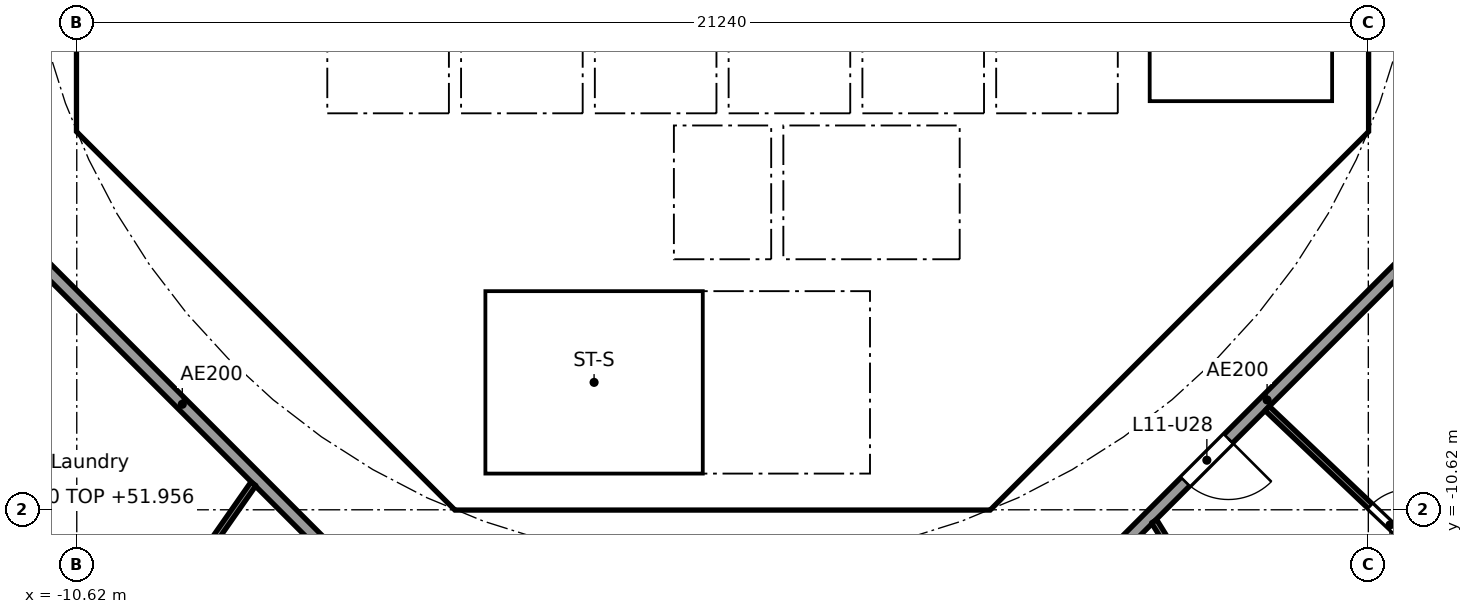
"""IFC4 building model, lengths in metres.
Left out: names, types, materials, properties, quantities, classifications, styles, units other than length and angle.
Written with IfcOpenShell. Run it as: python <this file> out.ifc"""

import sys

from ifc_helpers import new_model, si_unit, direction, frame, frame_2d, origin, place, context, subcontext, project, spatial, polyline, rectangle, outline, extrude, element, fill, save


model = new_model("IFC4")
c1 = context("Model", 3, precision=1e-05, world=origin(), true_north=direction((0.0, 1.0)))
c2 = subcontext(c1, "Body", "Model", "MODEL_VIEW")
j1 = project(units=[si_unit("LENGTHUNIT", "METRE"), si_unit("PLANEANGLEUNIT", "RADIAN")], contexts=[c1])
p1 = place(None, origin())
s1 = spatial("IfcSite", under=j1, at=p1, CompositionType="ELEMENT")
p2 = place(p1, origin())
s2 = spatial("IfcBuilding", under=s1, at=p2, CompositionType="ELEMENT")
p3 = place(p2, frame((0.0, 0.0, 49.2)))
s3 = spatial("IfcBuildingStorey", under=s2, at=p3, CompositionType="ELEMENT", Elevation=49.2)
p4 = place(p3, frame((-10.325, 3.801, 0.0), z_axis=(0.0, 0.0, 1.0), x_axis=(0.0, -1.0, 0.0)))
e1 = element("IfcWall", 1, at=p4, inside=s3, PredefinedType="SHEAR", context=c2, shape_type="SweptSolid", body=[
    extrude(rectangle(XDim=7.602, YDim=0.6, at=frame_2d((3.801, 0.0))), origin(), (0.0, 0.0, 1.0), 3.44),
])
p5 = place(p4, frame((0.651, 0.0, 0.0)))
e2 = element("IfcOpeningElement", 2, at=p5, cuts=e1, PredefinedType="OPENING", context=c2, shape_type="SweptSolid", body=[
    extrude(rectangle(XDim=1.5, YDim=2.1, at=frame_2d((0.75, 1.05))), frame((0.0, 0.31, 0.0), z_axis=(0.0, -1.0, 0.0), x_axis=(1.0, 0.0, 0.0)), (0.0, 0.0, 1.0), 0.62),
])
p6 = place(p4, frame((5.451, 0.0, 0.0)))
e3 = element("IfcOpeningElement", 3, at=p6, cuts=e1, PredefinedType="OPENING", context=c2, shape_type="SweptSolid", body=[
    extrude(rectangle(XDim=1.5, YDim=2.1, at=frame_2d((0.75, 1.05))), frame((0.0, 0.31, 0.0), z_axis=(0.0, -1.0, 0.0), x_axis=(1.0, 0.0, 0.0)), (0.0, 0.0, 1.0), 0.62),
])
p7 = place(p3, frame((-9.988, -4.613, 0.0), z_axis=(0.0, 0.0, 1.0), x_axis=(0.707106781187, -0.707106781187, 0.0)))
e4 = element("IfcWall", 4, at=p7, inside=s3, PredefinedType="SHEAR", context=c2, shape_type="SweptSolid", body=[
    extrude(rectangle(XDim=7.602, YDim=0.6, at=frame_2d((3.801, 0.0))), origin(), (0.0, 0.0, 1.0), 3.44),
])
p8 = place(p7, frame((6.151, 0.0, 0.0)))
e5 = element("IfcOpeningElement", 5, at=p8, cuts=e4, PredefinedType="OPENING", context=c2, shape_type="SweptSolid", body=[
    extrude(rectangle(XDim=1.1, YDim=2.1, at=frame_2d((0.55, 1.05))), frame((0.0, 0.31, 0.0), z_axis=(0.0, -1.0, 0.0), x_axis=(1.0, 0.0, 0.0)), (0.0, 0.0, 1.0), 0.62),
])
p9 = place(p3, frame((4.613, -9.988, 0.0), z_axis=(0.0, 0.0, 1.0), x_axis=(0.707106781187, 0.707106781187, 0.0)))
e6 = element("IfcWall", 6, at=p9, inside=s3, PredefinedType="SHEAR", context=c2, shape_type="SweptSolid", body=[
    extrude(rectangle(XDim=7.602, YDim=0.6, at=frame_2d((3.801, 0.0))), origin(), (0.0, 0.0, 1.0), 3.44),
])
p10 = place(p9, frame((3.201, 0.0, 0.0)))
e7 = element("IfcOpeningElement", 7, at=p10, cuts=e6, PredefinedType="OPENING", context=c2, shape_type="SweptSolid", body=[
    extrude(rectangle(XDim=1.2, YDim=2.1, at=frame_2d((0.6, 1.05))), frame((0.0, 0.31, 0.0), z_axis=(0.0, -1.0, 0.0), x_axis=(1.0, 0.0, 0.0)), (0.0, 0.0, 1.0), 0.62),
])
p11 = place(p3, frame((4.0, -10.025, 0.0), z_axis=(0.0, 0.0, 1.0), x_axis=(0.0, 1.0, 0.0)))
e8 = element("IfcWall", 8, at=p11, inside=s3, PredefinedType="SOLIDWALL", context=c2, shape_type="SweptSolid", body=[
    extrude(rectangle(XDim=3.0, YDim=0.2, at=frame_2d((1.5, 0.0))), origin(), (0.0, 0.0, 1.0), 3.44),
])
p12 = place(p11, frame((0.975, 0.0, 0.0)))
e9 = element("IfcOpeningElement", 9, at=p12, cuts=e8, PredefinedType="OPENING", context=c2, shape_type="SweptSolid", body=[
    extrude(rectangle(XDim=1.1, YDim=2.1, at=frame_2d((0.55, 1.05))), frame((0.0, 0.11, 0.0), z_axis=(0.0, -1.0, 0.0), x_axis=(1.0, 0.0, 0.0)), (0.0, 0.0, 1.0), 0.22),
])
p13 = place(p3, frame((-6.2, -7.827, 0.0), z_axis=(0.0, 0.0, 1.0), x_axis=(0.0, 1.0, 0.0)))
e10 = element("IfcWall", 10, at=p13, inside=s3, PredefinedType="PARTITIONING", context=c2, shape_type="SweptSolid", body=[
    extrude(rectangle(XDim=3.527, YDim=0.15, at=frame_2d((1.763, 0.0))), origin(), (0.0, 0.0, 1.0), 3.44),
])
p14 = place(p13, frame((1.276, 0.0, 0.0)))
e11 = element("IfcOpeningElement", 11, at=p14, cuts=e10, PredefinedType="OPENING", context=c2, shape_type="SweptSolid", body=[
    extrude(rectangle(XDim=0.9, YDim=2.1, at=frame_2d((0.45, 1.05))), frame((0.0, 0.085, 0.0), z_axis=(0.0, -1.0, 0.0), x_axis=(1.0, 0.0, 0.0)), (0.0, 0.0, 1.0), 0.17),
])
p15 = place(p3, frame((4.0, -6.5, 0.0), z_axis=(0.0, 0.0, 1.0), x_axis=(0.0, 1.0, 0.0)))
e12 = element("IfcWall", 12, at=p15, inside=s3, PredefinedType="SOLIDWALL", context=c2, shape_type="SweptSolid", body=[
    extrude(rectangle(XDim=2.2, YDim=0.2, at=frame_2d((1.1, 0.0))), origin(), (0.0, 0.0, 1.0), 3.44),
])
p16 = place(p15, frame((0.55, 0.0, 0.0)))
e13 = element("IfcOpeningElement", 13, at=p16, cuts=e12, PredefinedType="OPENING", context=c2, shape_type="SweptSolid", body=[
    extrude(rectangle(XDim=1.1, YDim=2.1, at=frame_2d((0.55, 1.05))), frame((0.0, 0.11, 0.0), z_axis=(0.0, -1.0, 0.0), x_axis=(1.0, 0.0, 0.0)), (0.0, 0.0, 1.0), 0.22),
])
p17 = place(p3, frame((-4.0, -6.5, 0.0), z_axis=(0.0, 0.0, 1.0), x_axis=(0.0, 1.0, 0.0)))
e14 = element("IfcWall", 14, at=p17, inside=s3, PredefinedType="SOLIDWALL", context=c2, shape_type="SweptSolid", body=[
    extrude(rectangle(XDim=2.2, YDim=0.2, at=frame_2d((1.1, 0.0))), origin(), (0.0, 0.0, 1.0), 3.44),
])
p18 = place(p17, frame((0.65, 0.0, 0.0)))
e15 = element("IfcOpeningElement", 15, at=p18, cuts=e14, PredefinedType="OPENING", context=c2, shape_type="SweptSolid", body=[
    extrude(rectangle(XDim=0.9, YDim=2.1, at=frame_2d((0.45, 1.05))), frame((0.0, 0.11, 0.0), z_axis=(0.0, -1.0, 0.0), x_axis=(1.0, 0.0, 0.0)), (0.0, 0.0, 1.0), 0.22),
])
p19 = place(p3, origin())
e16 = element("IfcWall", 16, at=p19, inside=s3, PredefinedType="SHEAR", context=c2, shape_type="SweptSolid", body=[
    extrude(outline(polyline([(-10.625, -3.801), (-10.025, -3.801), (-10.025, -4.152), (-9.776, -4.401), (-10.2, -4.825), (-10.625, -4.401), (-10.625, -3.801)])), origin(), (0.0, 0.0, 1.0), 3.44),
])
p20 = place(p3, origin())
e17 = element("IfcWall", 17, at=p20, inside=s3, PredefinedType="SHEAR", context=c2, shape_type="SweptSolid", body=[
    extrude(outline(polyline([(-4.152, -10.025), (4.152, -10.025), (4.401, -9.776), (4.825, -10.2), (4.401, -10.625), (-4.401, -10.625), (-4.825, -10.2), (-4.401, -9.776), (-4.152, -10.025)])), origin(), (0.0, 0.0, 1.0), 3.44),
])
p21 = place(p3, origin())
e18 = element("IfcWall", 18, at=p21, inside=s3, PredefinedType="SHEAR", context=c2, shape_type="SweptSolid", body=[
    extrude(outline(polyline([(9.776, -4.401), (10.025, -4.152), (10.025, -3.801), (10.025, 4.152), (9.776, 4.401), (10.2, 4.825), (10.625, 4.401), (10.625, -4.401), (10.2, -4.825), (9.776, -4.401)])), origin(), (0.0, 0.0, 1.0), 3.44),
])
for number, where, z_axis, x_axis in (
    (19, (-0.9, -6.5, 0.0), (0.0, 0.0, 1.0), (0.0, 1.0, 0.0)),
    (20, (0.9, -6.5, 0.0), (0.0, 0.0, 1.0), (0.0, 1.0, 0.0)),
):
    element("IfcWall", number, at=place(p3, frame(where, z_axis=z_axis, x_axis=x_axis)), inside=s3, PredefinedType="SOLIDWALL", context=c2, shape_type="SweptSolid", body=[
        extrude(rectangle(XDim=2.2, YDim=0.2, at=frame_2d((1.1, 0.0))), origin(), (0.0, 0.0, 1.0), 3.44),
    ])
p22 = place(p3, origin())
e21 = element("IfcWall", 21, at=p22, inside=s3, PredefinedType="SOLIDWALL", context=c2, shape_type="SweptSolid", body=[
    extrude(outline(polyline([(-6.7, -2.1), (-6.5, -2.1), (-6.5, -4.1), (-4.5, -4.1), (-4.5, -2.1), (-4.3, -2.1), (-4.3, -4.1), (-2.3, -4.1), (-2.3, -2.1), (-2.1, -2.1), (-2.1, -4.1), (-0.1, -4.1), (-0.1, -2.1), (0.1, -2.1), (0.1, -4.1), (2.1, -4.1), (2.1, -2.1), (2.3, -2.1), (2.3, -4.1), (4.3, -4.1), (4.3, -2.1), (4.5, -2.1), (4.5, -4.1), (6.5, -4.1), (6.5, -2.1), (6.7, -2.1), (6.7, -4.3), (-6.7, -4.3), (-6.7, -2.1)])), origin(), (0.0, 0.0, 1.0), 3.44),
])
p23 = place(p3, frame((-10.025, -4.0, 0.0), z_axis=(0.0, 0.0, 1.0), x_axis=(1.0, 0.0, 0.0)))
e22 = element("IfcWall", 22, at=p23, inside=s3, PredefinedType="PARTITIONING", context=c2, shape_type="SweptSolid", body=[
    extrude(rectangle(XDim=3.325, YDim=0.2, at=frame_2d((1.662, 0.0))), origin(), (0.0, 0.0, 1.0), 3.44),
])
p24 = place(p3, origin())
e23 = element("IfcWall", 23, at=p24, inside=s3, PredefinedType="SOLIDWALL", context=c2, shape_type="SweptSolid", body=[
    extrude(outline(polyline([(-3.9, -10.025), (-4.1, -10.025), (-4.1, -7.025), (-3.9, -7.025), (-3.9, -10.025)])), origin(), (0.0, 0.0, 1.0), 3.44),
])
p25 = place(p3, origin())
e24 = element("IfcWall", 24, at=p25, inside=s3, PredefinedType="SOLIDWALL", context=c2, shape_type="SweptSolid", body=[
    extrude(outline(polyline([(4.1, -7.025), (-4.1, -7.025), (-4.1, -6.5), (4.1, -6.5), (4.1, -7.025)])), origin(), (0.0, 0.0, 1.0), 3.44),
])
p26 = place(p3, origin())
e25 = element("IfcWall", 25, at=p26, inside=s3, PredefinedType="SOLIDWALL", context=c2, shape_type="SweptSolid", body=[
    extrude(outline(polyline([(7.025, -3.9), (6.7, -3.9), (6.7, 3.9), (7.025, 3.9), (7.025, -3.9)])), origin(), (0.0, 0.0, 1.0), 3.44),
])
p27 = place(p3, origin())
e26 = element("IfcWall", 26, at=p27, inside=s3, PredefinedType="SOLIDWALL", context=c2, shape_type="SweptSolid", body=[
    extrude(outline(polyline([(10.025, -4.1), (6.7, -4.1), (6.7, -3.9), (10.025, -3.9), (10.025, -4.1)])), origin(), (0.0, 0.0, 1.0), 3.44),
])
p28 = place(p3, frame((-12.635, -5.134, 0.0), z_axis=(0.0, 0.0, 1.0), x_axis=(0.707106781187, -0.707106781187, 0.0)))
e27 = element("IfcWall", 27, at=p28, inside=s3, PredefinedType="PARTITIONING", context=c2, shape_type="SweptSolid", body=[
    extrude(rectangle(XDim=10.609, YDim=0.2, at=frame_2d((5.305, 0.0))), origin(), (0.0, 0.0, 1.0), 3.44),
])
p29 = place(p3, frame((5.275, -12.494, 0.0), z_axis=(0.0, 0.0, 1.0), x_axis=(0.707106781187, 0.707106781187, 0.0)))
e28 = element("IfcWall", 28, at=p29, inside=s3, PredefinedType="PARTITIONING", context=c2, shape_type="SweptSolid", body=[
    extrude(rectangle(XDim=10.409, YDim=0.2, at=frame_2d((5.205, 0.0))), origin(), (0.0, 0.0, 1.0), 3.44),
])
p30 = place(p29, frame((3.303, 0.0, 0.0)))
e29 = element("IfcOpeningElement", 29, at=p30, cuts=e28, PredefinedType="OPENING", context=c2, shape_type="SweptSolid", body=[
    extrude(rectangle(XDim=1.0, YDim=2.1, at=frame_2d((0.5, 1.05))), frame((0.0, 0.11, 0.0), z_axis=(0.0, -1.0, 0.0), x_axis=(1.0, 0.0, 0.0)), (0.0, 0.0, 1.0), 0.22),
])
p31 = place(p3, frame((-13.222, -10.007, 0.0), z_axis=(0.0, 0.0, 1.0), x_axis=(0.640807748916, -0.767701393075, 0.0)))
e30 = element("IfcWall", 30, at=p31, inside=s3, PredefinedType="PARTITIONING", context=c2, shape_type="SweptSolid", body=[
    extrude(rectangle(XDim=4.737, YDim=0.1, at=frame_2d((2.368, 0.0))), origin(), (0.0, 0.0, 1.0), 2.756),
])
p32 = place(p31, frame((1.943, 0.0, 0.0)))
e31 = element("IfcOpeningElement", 31, at=p32, cuts=e30, PredefinedType="OPENING", context=c2, shape_type="SweptSolid", body=[
    extrude(rectangle(XDim=0.9, YDim=2.1, at=frame_2d((0.45, 1.05))), frame((0.0, 0.06, 0.0), z_axis=(0.0, -1.0, 0.0), x_axis=(1.0, 0.0, 0.0)), (0.0, 0.0, 1.0), 0.12),
])
p33 = place(p3, frame((-7.715, -10.193, 0.0), z_axis=(0.0, 0.0, 1.0), x_axis=(-0.573126502256, -0.819466907454, 0.0)))
e32 = element("IfcWall", 32, at=p33, inside=s3, PredefinedType="PARTITIONING", context=c2, shape_type="SweptSolid", body=[
    extrude(rectangle(XDim=9.954, YDim=0.1, at=frame_2d((4.977, 0.0))), origin(), (0.0, 0.0, 1.0), 2.687),
])
p34 = place(p3, frame((7.097, -10.81, 0.0), z_axis=(0.0, 0.0, 1.0), x_axis=(0.526453266471, -0.850204068576, 0.0)))
e33 = element("IfcWall", 33, at=p34, inside=s3, PredefinedType="PARTITIONING", context=c2, shape_type="SweptSolid", body=[
    extrude(rectangle(XDim=19.85, YDim=0.1, at=frame_2d((9.925, 0.0))), origin(), (0.0, 0.0, 1.0), 2.687),
])
p35 = place(p34, frame((0.35, 0.0, 0.0)))
e34 = element("IfcOpeningElement", 34, at=p35, cuts=e33, PredefinedType="OPENING", context=c2, shape_type="SweptSolid", body=[
    extrude(rectangle(XDim=0.9, YDim=2.1, at=frame_2d((0.45, 1.05))), frame((0.0, 0.06, 0.0), z_axis=(0.0, -1.0, 0.0), x_axis=(1.0, 0.0, 0.0)), (0.0, 0.0, 1.0), 0.12),
])
p36 = place(p34, frame((8.795, 0.0, 0.0)))
e35 = element("IfcOpeningElement", 35, at=p36, cuts=e33, PredefinedType="OPENING", context=c2, shape_type="SweptSolid", body=[
    extrude(rectangle(XDim=0.9, YDim=2.1, at=frame_2d((0.45, 1.05))), frame((0.0, 0.06, 0.0), z_axis=(0.0, -1.0, 0.0), x_axis=(1.0, 0.0, 0.0)), (0.0, 0.0, 1.0), 0.12),
])
p37 = place(p3, frame((8.957, -8.953, 0.0), z_axis=(0.0, 0.0, 1.0), x_axis=(0.725250022034, -0.688485588476, 0.0)))
e36 = element("IfcWall", 36, at=p37, inside=s3, PredefinedType="PARTITIONING", context=c2, shape_type="SweptSolid", body=[
    extrude(rectangle(XDim=12.963, YDim=0.1, at=frame_2d((6.481, 0.0))), origin(), (0.0, 0.0, 1.0), 2.687),
])
p38 = place(p37, frame((2.333, 0.0, 0.0)))
e37 = element("IfcOpeningElement", 37, at=p38, cuts=e36, PredefinedType="OPENING", context=c2, shape_type="SweptSolid", body=[
    extrude(rectangle(XDim=0.9, YDim=2.1, at=frame_2d((0.45, 1.05))), frame((0.0, 0.06, 0.0), z_axis=(0.0, -1.0, 0.0), x_axis=(1.0, 0.0, 0.0)), (0.0, 0.0, 1.0), 0.12),
])
p39 = place(p37, frame((8.79, 0.0, 0.0)))
e38 = element("IfcOpeningElement", 38, at=p39, cuts=e36, PredefinedType="OPENING", context=c2, shape_type="SweptSolid", body=[
    extrude(rectangle(XDim=0.9, YDim=2.1, at=frame_2d((0.45, 1.05))), frame((0.0, 0.06, 0.0), z_axis=(0.0, -1.0, 0.0), x_axis=(1.0, 0.0, 0.0)), (0.0, 0.0, 1.0), 0.12),
])
p40 = place(p16, origin())
e39 = element("IfcDoor", 39, at=p40, inside=s3, OperationType="DOUBLE_DOOR_SLIDING", PredefinedType="DOOR", context=c2, shape_type="SweptSolid", body=[
    extrude(rectangle(XDim=1.1, YDim=2.1, at=frame_2d((0.55, 1.05))), frame((0.0, 0.025, 0.0), z_axis=(0.0, -1.0, 0.0), x_axis=(1.0, 0.0, 0.0)), (0.0, 0.0, 1.0), 0.05),
])
fill(e13, e39)
p41 = place(p12, origin())
e40 = element("IfcDoor", 40, at=p41, inside=s3, OperationType="SINGLE_SWING_LEFT", PredefinedType="DOOR", context=c2, shape_type="SweptSolid", body=[
    extrude(rectangle(XDim=1.1, YDim=2.1, at=frame_2d((0.55, 1.05))), frame((0.0, 0.025, 0.0), z_axis=(0.0, -1.0, 0.0), x_axis=(1.0, 0.0, 0.0)), (0.0, 0.0, 1.0), 0.05),
])
fill(e9, e40)
p42 = place(p14, origin())
e41 = element("IfcDoor", 41, at=p42, inside=s3, OperationType="SINGLE_SWING_LEFT", PredefinedType="DOOR", context=c2, shape_type="SweptSolid", body=[
    extrude(rectangle(XDim=0.9, YDim=2.1, at=frame_2d((0.45, 1.05))), frame((0.0, 0.025, 0.0), z_axis=(0.0, -1.0, 0.0), x_axis=(1.0, 0.0, 0.0)), (0.0, 0.0, 1.0), 0.05),
])
fill(e11, e41)
p43 = place(p18, frame((0.9, 0.0, 0.0), x_axis=(-1.0, 0.0, 0.0)))
e42 = element("IfcDoor", 42, at=p43, inside=s3, OperationType="SINGLE_SWING_LEFT", PredefinedType="DOOR", context=c2, shape_type="SweptSolid", body=[
    extrude(rectangle(XDim=0.9, YDim=2.1, at=frame_2d((0.45, 1.05))), frame((0.0, 0.025, 0.0), z_axis=(0.0, -1.0, 0.0), x_axis=(1.0, 0.0, 0.0)), (0.0, 0.0, 1.0), 0.05),
])
fill(e15, e42)
p44 = place(p10, origin())
e43 = element("IfcDoor", 43, at=p44, inside=s3, OperationType="SINGLE_SWING_RIGHT", PredefinedType="DOOR", context=c2, shape_type="SweptSolid", body=[
    extrude(rectangle(XDim=1.2, YDim=2.1, at=frame_2d((0.6, 1.05))), frame((0.0, 0.025, 0.0), z_axis=(0.0, -1.0, 0.0), x_axis=(1.0, 0.0, 0.0)), (0.0, 0.0, 1.0), 0.05),
])
fill(e7, e43)
p45 = place(p6, origin())
e44 = element("IfcDoor", 44, at=p45, inside=s3, OperationType="DOUBLE_DOOR_SINGLE_SWING", PredefinedType="DOOR", context=c2, shape_type="SweptSolid", body=[
    extrude(rectangle(XDim=1.5, YDim=2.1, at=frame_2d((0.75, 1.05))), frame((0.0, 0.025, 0.0), z_axis=(0.0, -1.0, 0.0), x_axis=(1.0, 0.0, 0.0)), (0.0, 0.0, 1.0), 0.05),
])
fill(e3, e44)
p46 = place(p8, origin())
e45 = element("IfcDoor", 45, at=p46, inside=s3, OperationType="SINGLE_SWING_RIGHT", PredefinedType="DOOR", context=c2, shape_type="SweptSolid", body=[
    extrude(rectangle(XDim=1.1, YDim=2.1, at=frame_2d((0.55, 1.05))), frame((0.0, 0.025, 0.0), z_axis=(0.0, -1.0, 0.0), x_axis=(1.0, 0.0, 0.0)), (0.0, 0.0, 1.0), 0.05),
])
fill(e5, e45)
p47 = place(p30, frame((1.0, 0.0, 0.0), x_axis=(-1.0, 0.0, 0.0)))
e46 = element("IfcDoor", 46, at=p47, inside=s3, OperationType="SINGLE_SWING_LEFT", PredefinedType="DOOR", context=c2, shape_type="SweptSolid", body=[
    extrude(rectangle(XDim=1.0, YDim=2.1, at=frame_2d((0.5, 1.05))), frame((0.0, 0.025, 0.0), z_axis=(0.0, -1.0, 0.0), x_axis=(1.0, 0.0, 0.0)), (0.0, 0.0, 1.0), 0.05),
])
fill(e29, e46)
p48 = place(p38, origin())
e47 = element("IfcDoor", 47, at=p48, inside=s3, OperationType="SINGLE_SWING_RIGHT", PredefinedType="DOOR", context=c2, shape_type="SweptSolid", body=[
    extrude(rectangle(XDim=0.9, YDim=2.1, at=frame_2d((0.45, 1.05))), frame((0.0, 0.025, 0.0), z_axis=(0.0, -1.0, 0.0), x_axis=(1.0, 0.0, 0.0)), (0.0, 0.0, 1.0), 0.05),
])
fill(e37, e47)
save(model, sys.argv[1])
